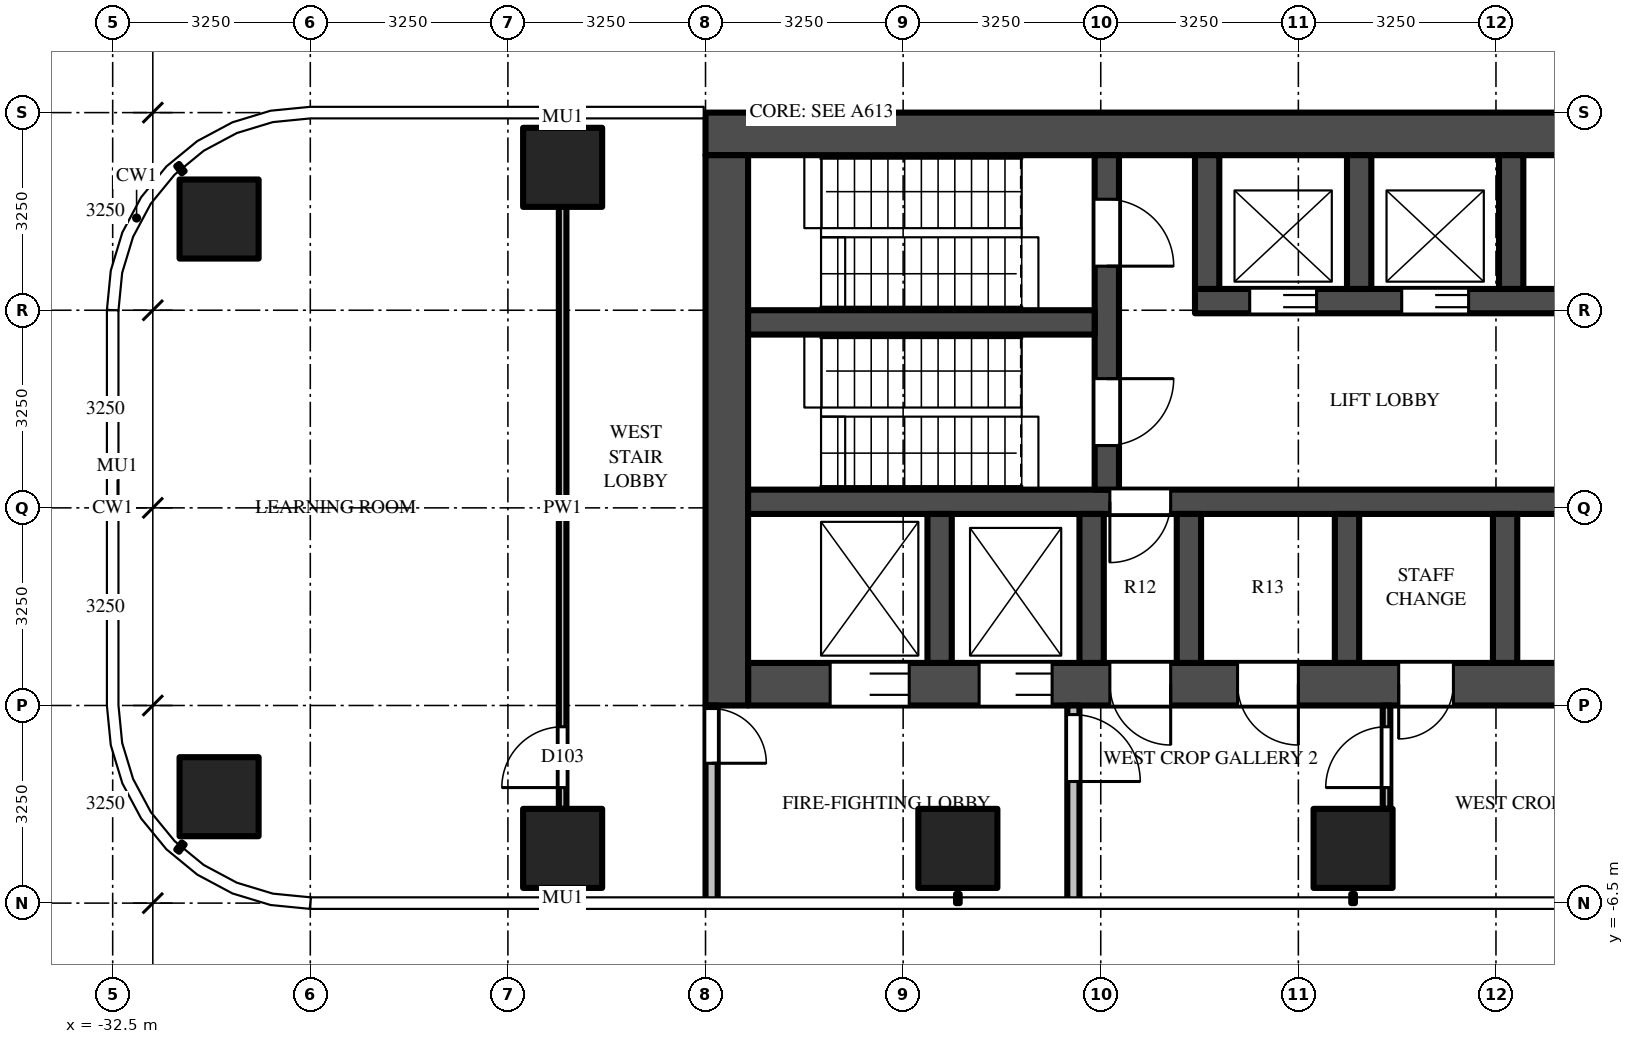
"""IFC4 building model, lengths in metres.
Left out: names, types, materials, properties, quantities, classifications, styles, units other than length and angle.
Written with IfcOpenShell. Run it as: python <this file> out.ifc"""

import sys

from ifc_helpers import new_model, si_unit, direction, frame, frame_2d, origin, origin_2d, place, context, subcontext, project, spatial, polyline, rectangle, outline, extrude, source, transform, mapped, element, fill, save


model = new_model("IFC4")
c1 = context("Model", 3, precision=1e-05, world=origin(), true_north=direction((0.0, 1.0)))
c2 = subcontext(c1, "Body", "Model", "MODEL_VIEW")
j1 = project(units=[si_unit("LENGTHUNIT", "METRE"), si_unit("PLANEANGLEUNIT", "RADIAN")], contexts=[c1])
p1 = place(None, origin())
s1 = spatial("IfcSite", under=j1, at=p1, CompositionType="ELEMENT")
p2 = place(p1, origin())
s2 = spatial("IfcBuilding", under=s1, at=p2, CompositionType="ELEMENT")
p3 = place(p2, frame((0.0, 0.0, 106.5)))
s3 = spatial("IfcBuildingStorey", under=s2, at=p3, CompositionType="ELEMENT", Elevation=106.5)
m1 = source(origin(), c2, "Body", "SweptSolid", [
    extrude(rectangle(XDim=1.3, YDim=1.3, at=origin_2d()), origin(), (0.0, 0.0, 1.0), 4.5),
])
for number, where, z_axis, x_axis in (
    (1, (-12.1, -5.6, 0.0), (0.0, 0.0, 1.0), (1.0, 0.0, 0.0)),
    (2, (-18.6, -5.6, 0.0), (0.0, 0.0, 1.0), (1.0, 0.0, 0.0)),
    (3, (-25.1, -5.6, 0.0), (0.0, 0.0, 1.0), (1.0, 0.0, 0.0)),
    (4, (-30.75, -4.75, 0.0), (0.0, 0.0, 1.0), (1.0, 0.0, 0.0)),
    (5, (-25.1, 5.6, 0.0), (0.0, 0.0, 1.0), (1.0, 0.0, 0.0)),
    (6, (-30.75, 4.75, 0.0), (0.0, 0.0, 1.0), (1.0, 0.0, 0.0)),
):
    element("IfcColumn", number, at=place(p3, frame(where, z_axis=z_axis, x_axis=x_axis)), inside=s3, PredefinedType="COLUMN", context=c2, shape_type="MappedRepresentation", body=[
        mapped(m1, transform((0.0, 0.0, 0.0))),
    ])
m2 = source(origin(), c2, "Body", "SweptSolid", [
    extrude(rectangle(XDim=16.5, YDim=0.7, at=frame_2d((8.25, 0.0))), origin(), (0.0, 0.0, 1.0), 4.25),
])
p4 = place(p3, frame((-6.25, 6.15, 0.0), z_axis=(0.0, 0.0, 1.0), x_axis=(-1.0, 0.0, 0.0)))
e7 = element("IfcWall", 7, at=p4, inside=s3, PredefinedType="SHEAR", context=c2, shape_type="MappedRepresentation", body=[
    mapped(m2, transform((0.0, 0.0, 0.0))),
])
m3 = source(origin(), c2, "Body", "SweptSolid", [
    extrude(rectangle(XDim=14.85, YDim=0.7, at=frame_2d((7.425, 0.0))), origin(), (0.0, 0.0, 1.0), 4.25),
])
p5 = place(p3, frame((-7.2, -2.9, 0.0), z_axis=(0.0, 0.0, 1.0), x_axis=(-1.0, 0.0, 0.0)))
e8 = element("IfcWall", 8, at=p5, inside=s3, PredefinedType="SHEAR", context=c2, shape_type="MappedRepresentation", body=[
    mapped(m3, transform((0.0, 0.0, 0.0))),
])
m4 = source(origin(), c2, "Body", "SweptSolid", [
    extrude(rectangle(XDim=1.3, YDim=2.1, at=frame_2d((0.65, 1.05))), frame((0.0, 0.36, 0.0), z_axis=(0.0, -1.0, 0.0), x_axis=(1.0, 0.0, 0.0)), (0.0, 0.0, 1.0), 0.72),
])
p6 = place(p5, frame((12.2, 0.0, 0.0)))
e9 = element("IfcOpeningElement", 9, at=p6, cuts=e8, PredefinedType="OPENING", context=c2, shape_type="MappedRepresentation", body=[
    mapped(m4, transform((0.0, 0.0, 0.0))),
])
m5 = source(origin(), c2, "Body", "SweptSolid", [
    extrude(rectangle(XDim=1.2, YDim=2.1, at=frame_2d((0.6, 1.05))), frame((0.0, 0.36, 0.0), z_axis=(0.0, -1.0, 0.0), x_axis=(1.0, 0.0, 0.0)), (0.0, 0.0, 1.0), 0.72),
])
p7 = place(p5, frame((9.85, 0.0, 0.0)))
e10 = element("IfcOpeningElement", 10, at=p7, cuts=e8, PredefinedType="OPENING", context=c2, shape_type="MappedRepresentation", body=[
    mapped(m5, transform((0.0, 0.0, 0.0))),
])
m6 = source(origin(), c2, "Body", "SweptSolid", [
    extrude(rectangle(XDim=1.0, YDim=2.1, at=frame_2d((0.5, 1.05))), frame((0.0, 0.36, 0.0), z_axis=(0.0, -1.0, 0.0), x_axis=(1.0, 0.0, 0.0)), (0.0, 0.0, 1.0), 0.72),
])
p8 = place(p5, frame((7.9, 0.0, 0.0)))
e11 = element("IfcOpeningElement", 11, at=p8, cuts=e8, PredefinedType="OPENING", context=c2, shape_type="MappedRepresentation", body=[
    mapped(m6, transform((0.0, 0.0, 0.0))),
])
m7 = source(origin(), c2, "Body", "SweptSolid", [
    extrude(rectangle(XDim=0.9, YDim=2.1, at=frame_2d((0.45, 1.05))), frame((0.0, 0.36, 0.0), z_axis=(0.0, -1.0, 0.0), x_axis=(1.0, 0.0, 0.0)), (0.0, 0.0, 1.0), 0.72),
])
p9 = place(p5, frame((0.65, 0.0, 0.0)))
e12 = element("IfcOpeningElement", 12, at=p9, cuts=e8, PredefinedType="OPENING", context=c2, shape_type="MappedRepresentation", body=[
    mapped(m7, transform((0.0, 0.0, 0.0))),
])
p10 = place(p5, frame((3.25, 0.0, 0.0)))
e13 = element("IfcOpeningElement", 13, at=p10, cuts=e8, PredefinedType="OPENING", context=c2, shape_type="MappedRepresentation", body=[
    mapped(m7, transform((0.0, 0.0, 0.0))),
])
p11 = place(p5, frame((5.8, 0.0, 0.0)))
e14 = element("IfcOpeningElement", 14, at=p11, cuts=e8, PredefinedType="OPENING", context=c2, shape_type="MappedRepresentation", body=[
    mapped(m6, transform((0.0, 0.0, 0.0))),
])
m8 = source(origin(), c2, "Body", "SweptSolid", [
    extrude(rectangle(XDim=9.05, YDim=0.7, at=frame_2d((4.525, 0.0))), origin(), (0.0, 0.0, 1.0), 4.25),
])
p12 = place(p3, frame((-22.4, 5.8, 0.0), z_axis=(0.0, 0.0, 1.0), x_axis=(0.0, -1.0, 0.0)))
e15 = element("IfcWall", 15, at=p12, inside=s3, PredefinedType="SHEAR", context=c2, shape_type="MappedRepresentation", body=[
    mapped(m8, transform((0.0, 0.0, 0.0))),
])
m9 = source(origin(), c2, "Body", "SweptSolid", [
    extrude(rectangle(XDim=7.5, YDim=0.4, at=frame_2d((3.75, 0.0))), origin(), (0.0, 0.0, 1.0), 4.25),
])
p13 = place(p3, frame((-7.2, 3.4, 0.0), z_axis=(0.0, 0.0, 1.0), x_axis=(-1.0, 0.0, 0.0)))
e16 = element("IfcWall", 16, at=p13, inside=s3, PredefinedType="SHEAR", context=c2, shape_type="MappedRepresentation", body=[
    mapped(m9, transform((0.0, 0.0, 0.0))),
])
m10 = source(origin(), c2, "Body", "SweptSolid", [
    extrude(rectangle(XDim=1.1, YDim=2.1, at=frame_2d((0.55, 1.05))), frame((0.0, 0.21, 0.0), z_axis=(0.0, -1.0, 0.0), x_axis=(1.0, 0.0, 0.0)), (0.0, 0.0, 1.0), 0.42),
])
p14 = place(p13, frame((3.0, 0.0, 0.0)))
e17 = element("IfcOpeningElement", 17, at=p14, cuts=e16, PredefinedType="OPENING", context=c2, shape_type="MappedRepresentation", body=[
    mapped(m10, transform((0.0, 0.0, 0.0))),
])
p15 = place(p13, frame((5.5, 0.0, 0.0)))
e18 = element("IfcOpeningElement", 18, at=p15, cuts=e16, PredefinedType="OPENING", context=c2, shape_type="MappedRepresentation", body=[
    mapped(m10, transform((0.0, 0.0, 0.0))),
])
m11 = source(origin(), c2, "Body", "SweptSolid", [
    extrude(rectangle(XDim=14.85, YDim=0.4, at=frame_2d((7.425, 0.0))), origin(), (0.0, 0.0, 1.0), 4.25),
])
p16 = place(p3, frame((-7.2, 0.1, 0.0), z_axis=(0.0, 0.0, 1.0), x_axis=(-1.0, 0.0, 0.0)))
e19 = element("IfcWall", 19, at=p16, inside=s3, PredefinedType="SHEAR", context=c2, shape_type="MappedRepresentation", body=[
    mapped(m11, transform((0.0, 0.0, 0.0))),
])
m12 = source(origin(), c2, "Body", "SweptSolid", [
    extrude(rectangle(XDim=1.0, YDim=2.1, at=frame_2d((0.5, 1.05))), frame((0.0, 0.21, 0.0), z_axis=(0.0, -1.0, 0.0), x_axis=(1.0, 0.0, 0.0)), (0.0, 0.0, 1.0), 0.42),
])
p17 = place(p16, frame((7.9, 0.0, 0.0)))
e20 = element("IfcOpeningElement", 20, at=p17, cuts=e19, PredefinedType="OPENING", context=c2, shape_type="MappedRepresentation", body=[
    mapped(m12, transform((0.0, 0.0, 0.0))),
])
m13 = source(origin(), c2, "Body", "SweptSolid", [
    extrude(rectangle(XDim=5.5, YDim=0.4, at=frame_2d((2.75, 0.0))), origin(), (0.0, 0.0, 1.0), 4.25),
])
p18 = place(p3, frame((-16.15, 5.8, 0.0), z_axis=(0.0, 0.0, 1.0), x_axis=(0.0, -1.0, 0.0)))
e21 = element("IfcWall", 21, at=p18, inside=s3, PredefinedType="SHEAR", context=c2, shape_type="MappedRepresentation", body=[
    mapped(m13, transform((0.0, 0.0, 0.0))),
])
p19 = place(p18, frame((0.725, 0.0, 0.0)))
e22 = element("IfcOpeningElement", 22, at=p19, cuts=e21, PredefinedType="OPENING", context=c2, shape_type="MappedRepresentation", body=[
    mapped(m10, transform((0.0, 0.0, 0.0))),
])
p20 = place(p18, frame((3.675, 0.0, 0.0)))
e23 = element("IfcOpeningElement", 23, at=p20, cuts=e21, PredefinedType="OPENING", context=c2, shape_type="MappedRepresentation", body=[
    mapped(m10, transform((0.0, 0.0, 0.0))),
])
m14 = source(origin(), c2, "Body", "SweptSolid", [
    extrude(rectangle(XDim=5.7, YDim=0.4, at=frame_2d((2.85, 0.0))), origin(), (0.0, 0.0, 1.0), 4.25),
])
p21 = place(p3, frame((-16.35, 3.05, 0.0), z_axis=(0.0, 0.0, 1.0), x_axis=(-1.0, 0.0, 0.0)))
e24 = element("IfcWall", 24, at=p21, inside=s3, PredefinedType="SHEAR", context=c2, shape_type="MappedRepresentation", body=[
    mapped(m14, transform((0.0, 0.0, 0.0))),
])
m15 = source(origin(), c2, "Body", "SweptSolid", [
    extrude(rectangle(XDim=2.2, YDim=0.4, at=frame_2d((1.1, 0.0))), origin(), (0.0, 0.0, 1.0), 4.25),
])
for number, where, z_axis, x_axis in (
    (25, (-9.5, 5.8, 0.0), (0.0, 0.0, 1.0), (0.0, -1.0, 0.0)),
    (26, (-12.0, 5.8, 0.0), (0.0, 0.0, 1.0), (0.0, -1.0, 0.0)),
    (27, (-14.5, 5.8, 0.0), (0.0, 0.0, 1.0), (0.0, -1.0, 0.0)),
):
    element("IfcWall", number, at=place(p3, frame(where, z_axis=z_axis, x_axis=x_axis)), inside=s3, PredefinedType="SHEAR", context=c2, shape_type="MappedRepresentation", body=[
        mapped(m15, transform((0.0, 0.0, 0.0))),
    ])
m16 = source(origin(), c2, "Body", "SweptSolid", [
    extrude(rectangle(XDim=2.45, YDim=0.4, at=frame_2d((1.225, 0.0))), origin(), (0.0, 0.0, 1.0), 4.25),
])
for number, where, z_axis, x_axis in (
    (28, (-9.6, -0.1, 0.0), (0.0, 0.0, 1.0), (0.0, -1.0, 0.0)),
    (29, (-12.2, -0.1, 0.0), (0.0, 0.0, 1.0), (0.0, -1.0, 0.0)),
    (30, (-14.8, -0.1, 0.0), (0.0, 0.0, 1.0), (0.0, -1.0, 0.0)),
    (31, (-16.4, -0.1, 0.0), (0.0, 0.0, 1.0), (0.0, -1.0, 0.0)),
    (32, (-18.9, -0.1, 0.0), (0.0, 0.0, 1.0), (0.0, -1.0, 0.0)),
):
    element("IfcWall", number, at=place(p3, frame(where, z_axis=z_axis, x_axis=x_axis)), inside=s3, PredefinedType="SHEAR", context=c2, shape_type="MappedRepresentation", body=[
        mapped(m16, transform((0.0, 0.0, 0.0))),
    ])
m17 = source(origin(), c2, "Body", "SweptSolid", [
    extrude(rectangle(XDim=3.25, YDim=0.2, at=frame_2d((1.625, 0.0))), origin(), (0.0, 0.0, 1.0), 4.25),
])
p22 = place(p3, frame((-16.7, -3.25, 0.0), z_axis=(0.0, 0.0, 1.0), x_axis=(0.0, -1.0, 0.0)))
e33 = element("IfcWall", 33, at=p22, inside=s3, PredefinedType="PARTITIONING", context=c2, shape_type="MappedRepresentation", body=[
    mapped(m17, transform((0.0, 0.0, 0.0))),
])
m18 = source(origin(), c2, "Body", "SweptSolid", [
    extrude(rectangle(XDim=1.1, YDim=2.1, at=frame_2d((0.55, 1.05))), frame((0.0, 0.11, 0.0), z_axis=(0.0, -1.0, 0.0), x_axis=(1.0, 0.0, 0.0)), (0.0, 0.0, 1.0), 0.22),
])
p23 = place(p22, frame((0.15, 0.0, 0.0)))
e34 = element("IfcOpeningElement", 34, at=p23, cuts=e33, PredefinedType="OPENING", context=c2, shape_type="MappedRepresentation", body=[
    mapped(m18, transform((0.0, 0.0, 0.0))),
])
p24 = place(p3, frame((-22.65, -3.25, 0.0), z_axis=(0.0, 0.0, 1.0), x_axis=(0.0, -1.0, 0.0)))
e35 = element("IfcWall", 35, at=p24, inside=s3, PredefinedType="PARTITIONING", context=c2, shape_type="MappedRepresentation", body=[
    mapped(m17, transform((0.0, 0.0, 0.0))),
])
m19 = source(origin(), c2, "Body", "SweptSolid", [
    extrude(rectangle(XDim=0.9, YDim=2.1, at=frame_2d((0.45, 1.05))), frame((0.0, 0.11, 0.0), z_axis=(0.0, -1.0, 0.0), x_axis=(1.0, 0.0, 0.0)), (0.0, 0.0, 1.0), 0.22),
])
p25 = place(p24, frame((0.05, 0.0, 0.0)))
e36 = element("IfcOpeningElement", 36, at=p25, cuts=e35, PredefinedType="OPENING", context=c2, shape_type="MappedRepresentation", body=[
    mapped(m19, transform((0.0, 0.0, 0.0))),
])
p26 = place(p3, origin())
e37 = element("IfcWall", 37, at=p26, inside=s3, PredefinedType="USERDEFINED", context=c2, shape_type="SweptSolid", body=[
    extrude(outline(polyline([(-29.606, -8.755), (-31.19, -8.519), (-32.552, -7.685), (-32.792, -7.351), (-32.305, -7.0), (-32.135, -7.237), (-30.98, -7.944), (-29.627, -8.146), (-29.446, -8.106), (-29.318, -8.692), (-29.606, -8.755)])), origin(), (0.0, 0.0, 1.0), 0.5),
])
m20 = source(origin(), c2, "Body", "SweptSolid", [
    extrude(rectangle(XDim=9.9, YDim=0.125, at=frame_2d((4.95, 0.0))), origin(), (0.0, 0.0, 1.0), 3.468),
])
p27 = place(p3, frame((-25.1, -4.95, 0.0), z_axis=(0.0, 0.0, 1.0), x_axis=(0.0, 1.0, 0.0)))
e38 = element("IfcWall", 38, at=p27, inside=s3, PredefinedType="PARTITIONING", context=c2, shape_type="MappedRepresentation", body=[
    mapped(m20, transform((0.0, 0.0, 0.0))),
])
m21 = source(origin(), c2, "Body", "SweptSolid", [
    extrude(rectangle(XDim=1.0, YDim=2.1, at=frame_2d((0.5, 1.05))), frame((0.0, 0.073, 0.0), z_axis=(0.0, -1.0, 0.0), x_axis=(1.0, 0.0, 0.0)), (0.0, 0.0, 1.0), 0.145),
])
p28 = place(p27, frame((0.35, 0.0, 0.0)))
e39 = element("IfcOpeningElement", 39, at=p28, cuts=e38, PredefinedType="OPENING", context=c2, shape_type="MappedRepresentation", body=[
    mapped(m21, transform((0.0, 0.0, 0.0))),
])
m22 = source(origin(), c2, "Body", "SweptSolid", [
    extrude(rectangle(XDim=1.7, YDim=0.125, at=frame_2d((0.85, 0.0))), origin(), (0.0, 0.0, 1.0), 4.25),
])
p29 = place(p3, frame((-11.55, -4.95, 0.0), z_axis=(0.0, 0.0, 1.0), x_axis=(0.0, 1.0, 0.0)))
e40 = element("IfcWall", 40, at=p29, inside=s3, PredefinedType="PARTITIONING", context=c2, shape_type="MappedRepresentation", body=[
    mapped(m22, transform((0.0, 0.0, 0.0))),
])
p30 = place(p29, frame((0.35, 0.0, 0.0)))
e41 = element("IfcOpeningElement", 41, at=p30, cuts=e40, PredefinedType="OPENING", context=c2, shape_type="MappedRepresentation", body=[
    mapped(m21, transform((0.0, 0.0, 0.0))),
])
m23 = source(origin(), c2, "Body", "SweptSolid", [
    extrude(rectangle(XDim=1.1, YDim=2.1, at=frame_2d((0.55, 1.05))), frame((0.0, 0.025, 0.0), z_axis=(0.0, -1.0, 0.0), x_axis=(1.0, 0.0, 0.0)), (0.0, 0.0, 1.0), 0.05),
])
p31 = place(p14, origin())
e42 = element("IfcDoor", 42, at=p31, inside=s3, OperationType="DOUBLE_DOOR_SLIDING", PredefinedType="DOOR", context=c2, shape_type="MappedRepresentation", body=[
    mapped(m23, transform((0.0, 0.0, 0.0))),
])
fill(e17, e42)
p32 = place(p15, origin())
e43 = element("IfcDoor", 43, at=p32, inside=s3, OperationType="DOUBLE_DOOR_SLIDING", PredefinedType="DOOR", context=c2, shape_type="MappedRepresentation", body=[
    mapped(m23, transform((0.0, 0.0, 0.0))),
])
fill(e18, e43)
m24 = source(origin(), c2, "Body", "SweptSolid", [
    extrude(rectangle(XDim=1.3, YDim=2.1, at=frame_2d((0.65, 1.05))), frame((0.0, -0.275, 0.0), z_axis=(0.0, -1.0, 0.0), x_axis=(1.0, 0.0, 0.0)), (0.0, 0.0, 1.0), 0.05),
])
p33 = place(p6, origin())
e44 = element("IfcDoor", 44, at=p33, inside=s3, OperationType="DOUBLE_DOOR_SLIDING", PredefinedType="DOOR", context=c2, shape_type="MappedRepresentation", body=[
    mapped(m24, transform((0.0, 0.0, 0.0))),
])
fill(e9, e44)
m25 = source(origin(), c2, "Body", "SweptSolid", [
    extrude(rectangle(XDim=1.2, YDim=2.1, at=frame_2d((0.6, 1.05))), frame((0.0, -0.275, 0.0), z_axis=(0.0, -1.0, 0.0), x_axis=(1.0, 0.0, 0.0)), (0.0, 0.0, 1.0), 0.05),
])
p34 = place(p7, origin())
e45 = element("IfcDoor", 45, at=p34, inside=s3, OperationType="DOUBLE_DOOR_SLIDING", PredefinedType="DOOR", context=c2, shape_type="MappedRepresentation", body=[
    mapped(m25, transform((0.0, 0.0, 0.0))),
])
fill(e10, e45)
p35 = place(p19, origin())
e46 = element("IfcDoor", 46, at=p35, inside=s3, OperationType="SINGLE_SWING_RIGHT", PredefinedType="DOOR", context=c2, shape_type="MappedRepresentation", body=[
    mapped(m23, transform((0.0, 0.0, 0.0))),
])
fill(e22, e46)
p36 = place(p20, origin())
e47 = element("IfcDoor", 47, at=p36, inside=s3, OperationType="SINGLE_SWING_LEFT", PredefinedType="DOOR", context=c2, shape_type="MappedRepresentation", body=[
    mapped(m23, transform((0.0, 0.0, 0.0))),
])
fill(e23, e47)
m26 = source(origin(), c2, "Body", "SweptSolid", [
    extrude(rectangle(XDim=1.0, YDim=2.1, at=frame_2d((0.5, 1.05))), frame((0.0, 0.025, 0.0), z_axis=(0.0, -1.0, 0.0), x_axis=(1.0, 0.0, 0.0)), (0.0, 0.0, 1.0), 0.05),
])
p37 = place(p17, origin())
e48 = element("IfcDoor", 48, at=p37, inside=s3, OperationType="SINGLE_SWING_RIGHT", PredefinedType="DOOR", context=c2, shape_type="MappedRepresentation", body=[
    mapped(m26, transform((0.0, 0.0, 0.0))),
])
fill(e20, e48)
m27 = source(origin(), c2, "Body", "SweptSolid", [
    extrude(rectangle(XDim=1.0, YDim=2.1, at=frame_2d((0.5, 1.05))), frame((0.0, -0.275, 0.0), z_axis=(0.0, -1.0, 0.0), x_axis=(1.0, 0.0, 0.0)), (0.0, 0.0, 1.0), 0.05),
])
p38 = place(p8, origin())
e49 = element("IfcDoor", 49, at=p38, inside=s3, OperationType="SINGLE_SWING_LEFT", PredefinedType="DOOR", context=c2, shape_type="MappedRepresentation", body=[
    mapped(m27, transform((0.0, 0.0, 0.0))),
])
fill(e11, e49)
p39 = place(p23, origin())
e50 = element("IfcDoor", 50, at=p39, inside=s3, OperationType="SINGLE_SWING_RIGHT", PredefinedType="DOOR", context=c2, shape_type="MappedRepresentation", body=[
    mapped(m23, transform((0.0, 0.0, 0.0))),
])
fill(e34, e50)
m28 = source(origin(), c2, "Body", "SweptSolid", [
    extrude(rectangle(XDim=0.9, YDim=2.1, at=frame_2d((0.45, 1.05))), frame((0.0, 0.025, 0.0), z_axis=(0.0, -1.0, 0.0), x_axis=(1.0, 0.0, 0.0)), (0.0, 0.0, 1.0), 0.05),
])
p40 = place(p25, origin())
e51 = element("IfcDoor", 51, at=p40, inside=s3, OperationType="SINGLE_SWING_RIGHT", PredefinedType="DOOR", context=c2, shape_type="MappedRepresentation", body=[
    mapped(m28, transform((0.0, 0.0, 0.0))),
])
fill(e36, e51)
m29 = source(origin(), c2, "Body", "SweptSolid", [
    extrude(rectangle(XDim=0.9, YDim=2.1, at=frame_2d((0.45, 1.05))), frame((0.0, -0.275, 0.0), z_axis=(0.0, -1.0, 0.0), x_axis=(1.0, 0.0, 0.0)), (0.0, 0.0, 1.0), 0.05),
])
p41 = place(p10, origin())
e52 = element("IfcDoor", 52, at=p41, inside=s3, OperationType="SINGLE_SWING_RIGHT", PredefinedType="DOOR", context=c2, shape_type="MappedRepresentation", body=[
    mapped(m29, transform((0.0, 0.0, 0.0))),
])
fill(e13, e52)
p42 = place(p11, origin())
e53 = element("IfcDoor", 53, at=p42, inside=s3, OperationType="SINGLE_SWING_LEFT", PredefinedType="DOOR", context=c2, shape_type="MappedRepresentation", body=[
    mapped(m27, transform((0.0, 0.0, 0.0))),
])
fill(e14, e53)
p43 = place(p28, origin())
e54 = element("IfcDoor", 54, at=p43, inside=s3, OperationType="SINGLE_SWING_LEFT", PredefinedType="DOOR", context=c2, shape_type="MappedRepresentation", body=[
    mapped(m26, transform((0.0, 0.0, 0.0))),
])
fill(e39, e54)
p44 = place(p30, origin())
e55 = element("IfcDoor", 55, at=p44, inside=s3, OperationType="SINGLE_SWING_LEFT", PredefinedType="DOOR", context=c2, shape_type="MappedRepresentation", body=[
    mapped(m26, transform((0.0, 0.0, 0.0))),
])
fill(e41, e55)
save(model, sys.argv[1])
